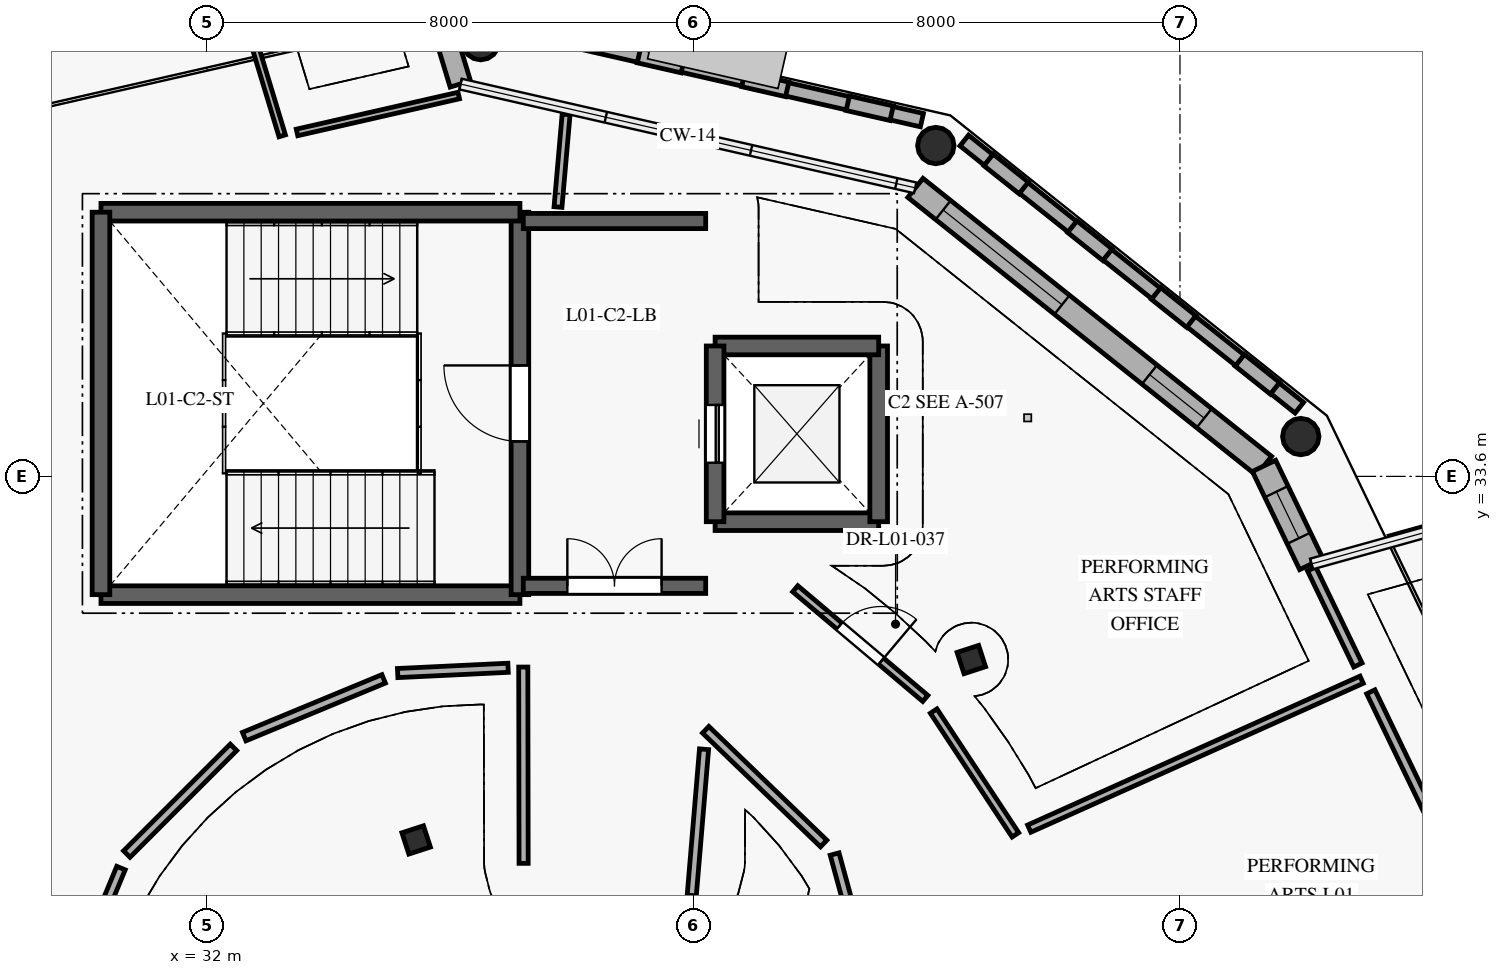
"""IFC4 building model, lengths in metres.
Left out: names, types, materials, properties, quantities, classifications, styles, units other than length and angle.
Written with IfcOpenShell. Run it as: python <this file> out.ifc"""

import sys

from ifc_helpers import new_model, si_unit, direction, frame, frame_2d, origin, origin_2d, place, context, subcontext, project, spatial, rectangle, circle, i_section, extrude, element, fill, save


model = new_model("IFC4")
c1 = context("Model", 3, precision=1e-05, world=origin(), true_north=direction((0.0, 1.0)))
c2 = subcontext(c1, "Body", "Model", "MODEL_VIEW")
j1 = project(units=[si_unit("LENGTHUNIT", "METRE"), si_unit("PLANEANGLEUNIT", "RADIAN")], contexts=[c1])
p1 = place(None, origin())
s1 = spatial("IfcSite", under=j1, at=p1, CompositionType="ELEMENT")
p2 = place(p1, origin())
s2 = spatial("IfcBuilding", under=s1, at=p2, CompositionType="ELEMENT")
p3 = place(p2, frame((0.0, 0.0, 4.2)))
s3 = spatial("IfcBuildingStorey", under=s2, at=p3, CompositionType="ELEMENT", Elevation=4.2)
for number, where, z_axis, x_axis in (
    (1, (35.439, 27.621, 0.0), (0.0, 0.0, 1.0), (0.951, 0.309, 0.0)),
    (2, (44.569, 30.588, 0.0), (0.0, 0.0, 1.0), (0.951, 0.309, 0.0)),
):
    element("IfcColumn", number, at=place(p3, frame(where, z_axis=z_axis, x_axis=x_axis)), inside=s3, PredefinedType="COLUMN", context=c2, shape_type="SweptSolid", body=[
        extrude(i_section(OverallWidth=0.373, OverallDepth=0.368, WebThickness=0.014, FlangeThickness=0.024, FilletRadius=0.015, at=origin_2d()), origin(), (0.0, 0.0, 1.0), 4.2),
    ])
for number, where, z_axis, x_axis in (
    (3, (49.987, 34.255, 0.0), (0.0, 0.0, 1.0), (-0.623, 0.782, 0.0)),
    (4, (43.985, 39.042, 0.0), (0.0, 0.0, 1.0), (-0.901, 0.434, 0.0)),
    (5, (36.5, 40.75, 0.0), (0.0, 0.0, 1.0), (-1.0, 0.0, 0.0)),
):
    element("IfcColumn", number, at=place(p3, frame(where, z_axis=z_axis, x_axis=x_axis)), inside=s3, PredefinedType="COLUMN", context=c2, shape_type="SweptSolid", body=[
        extrude(circle(Radius=0.3, at=origin_2d()), origin(), (0.0, 0.0, 1.0), 4.2),
    ])
p4 = place(p3, frame((43.649, 38.345, 0.0), z_axis=(0.0, 0.0, 1.0), x_axis=(0.781819636461, -0.623504655992, 0.0)))
e6 = element("IfcWall", 6, at=p4, inside=s3, PredefinedType="SOLIDWALL", context=c2, shape_type="SweptSolid", body=[
    extrude(rectangle(XDim=7.333, YDim=0.4, at=frame_2d((3.667, 0.0))), origin(), (0.0, 0.0, 1.0), 3.94),
])
p5 = place(p4, frame((0.583, 0.0, 0.85)))
e7 = element("IfcOpeningElement", 7, at=p5, cuts=e6, PredefinedType="OPENING", context=c2, shape_type="SweptSolid", body=[
    extrude(rectangle(XDim=2.5, YDim=1.3, at=frame_2d((1.25, 0.65))), frame((0.0, 0.21, 0.0), z_axis=(0.0, -1.0, 0.0), x_axis=(1.0, 0.0, 0.0)), (0.0, 0.0, 1.0), 0.42),
])
p6 = place(p4, frame((4.925, 0.0, 0.85)))
e8 = element("IfcOpeningElement", 8, at=p6, cuts=e6, PredefinedType="OPENING", context=c2, shape_type="SweptSolid", body=[
    extrude(rectangle(XDim=1.15, YDim=1.5, at=frame_2d((0.575, 0.75))), frame((0.0, 0.21, 0.0), z_axis=(0.0, -1.0, 0.0), x_axis=(1.0, 0.0, 0.0)), (0.0, 0.0, 1.0), 0.42),
])
p7 = place(p3, frame((49.382, 33.773, 0.0), z_axis=(0.0, 0.0, 1.0), x_axis=(0.433922119058, -0.90095038409, 0.0)))
e9 = element("IfcWall", 9, at=p7, inside=s3, PredefinedType="SOLIDWALL", context=c2, shape_type="SweptSolid", body=[
    extrude(rectangle(XDim=1.792, YDim=0.425, at=frame_2d((0.896, 0.0))), origin(), (0.0, 0.0, 1.0), 3.94),
])
p8 = place(p7, frame((0.471, 0.0, 0.85)))
e10 = element("IfcOpeningElement", 10, at=p8, cuts=e9, PredefinedType="OPENING", context=c2, shape_type="SweptSolid", body=[
    extrude(rectangle(XDim=0.85, YDim=1.4, at=frame_2d((0.425, 0.7))), frame((0.0, 0.222, 0.0), z_axis=(0.0, -1.0, 0.0), x_axis=(1.0, 0.0, 0.0)), (0.0, 0.0, 1.0), 0.445),
])
p9 = place(p3, frame((34.143, 46.728, 0.0), z_axis=(0.0, 0.0, 1.0), x_axis=(0.289999622439, -0.957026759806, 0.0)))
e11 = element("IfcWall", 11, at=p9, inside=s3, PredefinedType="SOLIDWALL", context=c2, shape_type="SweptSolid", body=[
    extrude(rectangle(XDim=6.974, YDim=0.35, at=frame_2d((3.487, 0.0))), origin(), (0.0, 0.0, 1.0), 3.369),
])
p10 = place(p9, frame((0.993, 0.0, 0.85)))
e12 = element("IfcOpeningElement", 12, at=p10, cuts=e11, PredefinedType="OPENING", context=c2, shape_type="SweptSolid", body=[
    extrude(rectangle(XDim=1.5, YDim=1.3, at=frame_2d((0.75, 0.65))), frame((0.0, 0.185, 0.0), z_axis=(0.0, -1.0, 0.0), x_axis=(1.0, 0.0, 0.0)), (0.0, 0.0, 1.0), 0.37),
])
p11 = place(p9, frame((4.231, 0.0, 0.85)))
e13 = element("IfcOpeningElement", 13, at=p11, cuts=e11, PredefinedType="OPENING", context=c2, shape_type="SweptSolid", body=[
    extrude(rectangle(XDim=2.0, YDim=1.3, at=frame_2d((1.0, 0.65))), frame((0.0, 0.185, 0.0), z_axis=(0.0, -1.0, 0.0), x_axis=(1.0, 0.0, 0.0)), (0.0, 0.0, 1.0), 0.37),
])
p12 = place(p3, frame((49.963, 34.73, 0.0), z_axis=(0.0, 0.0, 1.0), x_axis=(-0.781827630302, 0.623494632291, 0.0)))
e14 = element("IfcWall", 14, at=p12, inside=s3, PredefinedType="ELEMENTEDWALL", context=c2, shape_type="SweptSolid", body=[
    extrude(rectangle(XDim=7.048, YDim=0.225, at=frame_2d((3.524, 0.0))), origin(), (0.0, 0.0, 1.0), 1.09),
])
for number, where, z_axis, x_axis in (
    (15, (49.563, 35.048, 1.09), (0.0, 0.0, 1.0), (-0.782, 0.623, 0.0)),
    (16, (48.186, 36.147, 1.09), (0.0, 0.0, 1.0), (-0.782, 0.623, 0.0)),
    (17, (46.808, 37.246, 1.09), (0.0, 0.0, 1.0), (-0.782, 0.623, 0.0)),
    (18, (45.431, 38.344, 1.09), (0.0, 0.0, 1.0), (-0.782, 0.623, 0.0)),
):
    element("IfcWall", number, at=place(p3, frame(where, z_axis=z_axis, x_axis=x_axis)), inside=s3, PredefinedType="ELEMENTEDWALL", context=c2, shape_type="SweptSolid", body=[
        extrude(rectangle(XDim=0.74, YDim=0.245, at=frame_2d((0.37, 0.0))), origin(), (0.0, 0.0, 1.0), 2.85),
    ])
p13 = place(p3, frame((43.756, 39.459, 0.0), z_axis=(0.0, 0.0, 1.0), x_axis=(-0.974930278984, 0.222510564064, 0.0)))
e19 = element("IfcWall", 19, at=p13, inside=s3, PredefinedType="ELEMENTEDWALL", context=c2, shape_type="SweptSolid", body=[
    extrude(rectangle(XDim=7.046, YDim=0.225, at=frame_2d((3.523, 0.0))), origin(), (0.0, 0.0, 1.0), 1.09),
])
p14 = place(p3, frame((43.258, 39.573, 1.09), z_axis=(0.0, 0.0, 1.0), x_axis=(-0.974960788757, 0.222376843189, 0.0)))
e20 = element("IfcWall", 20, at=p14, inside=s3, PredefinedType="ELEMENTEDWALL", context=c2, shape_type="SweptSolid", body=[
    extrude(rectangle(XDim=0.74, YDim=0.245, at=frame_2d((0.37, 0.0))), origin(), (0.0, 0.0, 1.0), 2.85),
])
p15 = place(p3, frame((41.541, 39.965, 1.09), z_axis=(0.0, 0.0, 1.0), x_axis=(-0.974977096703, 0.222305332604, 0.0)))
e21 = element("IfcWall", 21, at=p15, inside=s3, PredefinedType="ELEMENTEDWALL", context=c2, shape_type="SweptSolid", body=[
    extrude(rectangle(XDim=0.74, YDim=0.245, at=frame_2d((0.37, 0.0))), origin(), (0.0, 0.0, 1.0), 2.85),
])
p16 = place(p3, frame((39.823, 40.357, 1.09), z_axis=(0.0, 0.0, 1.0), x_axis=(-0.974960788757, 0.222376843189, 0.0)))
e22 = element("IfcWall", 22, at=p16, inside=s3, PredefinedType="ELEMENTEDWALL", context=c2, shape_type="SweptSolid", body=[
    extrude(rectangle(XDim=0.74, YDim=0.245, at=frame_2d((0.37, 0.0))), origin(), (0.0, 0.0, 1.0), 2.85),
])
p17 = place(p3, frame((30.255, 31.655, 0.0), z_axis=(0.0, 0.0, 1.0), x_axis=(1.0, 0.0, 0.0)))
e23 = element("IfcWall", 23, at=p17, inside=s3, PredefinedType="SHEAR", context=c2, shape_type="SweptSolid", body=[
    extrude(rectangle(XDim=6.89, YDim=0.29, at=frame_2d((3.445, 0.0))), origin(), (0.0, 0.0, 1.0), 3.95),
])
p18 = place(p3, frame((37.145, 31.655, 0.0), z_axis=(0.0, 0.0, 1.0), x_axis=(0.0, 1.0, 0.0)))
e24 = element("IfcWall", 24, at=p18, inside=s3, PredefinedType="SHEAR", context=c2, shape_type="SweptSolid", body=[
    extrude(rectangle(XDim=6.29, YDim=0.29, at=frame_2d((3.145, 0.0))), origin(), (0.0, 0.0, 1.0), 3.95),
])
p19 = place(p18, frame((2.52, 0.0, 0.0)))
e25 = element("IfcOpeningElement", 25, at=p19, cuts=e24, PredefinedType="OPENING", context=c2, shape_type="SweptSolid", body=[
    extrude(rectangle(XDim=1.25, YDim=2.1, at=frame_2d((0.625, 1.05))), frame((0.0, 0.155, 0.0), z_axis=(0.0, -1.0, 0.0), x_axis=(1.0, 0.0, 0.0)), (0.0, 0.0, 1.0), 0.31),
])
p20 = place(p3, frame((37.145, 37.945, 0.0), z_axis=(0.0, 0.0, 1.0), x_axis=(-1.0, 0.0, 0.0)))
e26 = element("IfcWall", 26, at=p20, inside=s3, PredefinedType="SHEAR", context=c2, shape_type="SweptSolid", body=[
    extrude(rectangle(XDim=6.89, YDim=0.29, at=frame_2d((3.445, 0.0))), origin(), (0.0, 0.0, 1.0), 3.95),
])
p21 = place(p3, frame((30.255, 37.945, 0.0), z_axis=(0.0, 0.0, 1.0), x_axis=(0.0, -1.0, 0.0)))
e27 = element("IfcWall", 27, at=p21, inside=s3, PredefinedType="SHEAR", context=c2, shape_type="SweptSolid", body=[
    extrude(rectangle(XDim=6.29, YDim=0.29, at=frame_2d((3.145, 0.0))), origin(), (0.0, 0.0, 1.0), 3.95),
])
p22 = place(p3, frame((40.355, 32.855, 0.0), z_axis=(0.0, 0.0, 1.0), x_axis=(1.0, 0.0, 0.0)))
e28 = element("IfcWall", 28, at=p22, inside=s3, PredefinedType="SHEAR", context=c2, shape_type="SweptSolid", body=[
    extrude(rectangle(XDim=2.69, YDim=0.29, at=frame_2d((1.345, 0.0))), origin(), (0.0, 0.0, 1.0), 3.95),
])
p23 = place(p3, frame((43.045, 32.855, 0.0), z_axis=(0.0, 0.0, 1.0), x_axis=(0.0, 1.0, 0.0)))
e29 = element("IfcWall", 29, at=p23, inside=s3, PredefinedType="SHEAR", context=c2, shape_type="SweptSolid", body=[
    extrude(rectangle(XDim=2.89, YDim=0.29, at=frame_2d((1.445, 0.0))), origin(), (0.0, 0.0, 1.0), 3.95),
])
p24 = place(p3, frame((43.045, 35.745, 0.0), z_axis=(0.0, 0.0, 1.0), x_axis=(-1.0, 0.0, 0.0)))
e30 = element("IfcWall", 30, at=p24, inside=s3, PredefinedType="SHEAR", context=c2, shape_type="SweptSolid", body=[
    extrude(rectangle(XDim=2.69, YDim=0.29, at=frame_2d((1.345, 0.0))), origin(), (0.0, 0.0, 1.0), 3.95),
])
p25 = place(p3, frame((40.355, 35.745, 0.0), z_axis=(0.0, 0.0, 1.0), x_axis=(0.0, -1.0, 0.0)))
e31 = element("IfcWall", 31, at=p25, inside=s3, PredefinedType="SHEAR", context=c2, shape_type="SweptSolid", body=[
    extrude(rectangle(XDim=2.89, YDim=0.29, at=frame_2d((1.445, 0.0))), origin(), (0.0, 0.0, 1.0), 3.95),
])
p26 = place(p25, frame((0.97, 0.0, 0.0)))
e32 = element("IfcOpeningElement", 32, at=p26, cuts=e31, PredefinedType="OPENING", context=c2, shape_type="SweptSolid", body=[
    extrude(rectangle(XDim=0.95, YDim=2.1, at=frame_2d((0.475, 1.05))), frame((0.0, 0.155, 0.0), z_axis=(0.0, -1.0, 0.0), x_axis=(1.0, 0.0, 0.0)), (0.0, 0.0, 1.0), 0.31),
])
p27 = place(p3, frame((37.2, 31.8, 0.0), z_axis=(0.0, 0.0, 1.0), x_axis=(1.0, 0.0, 0.0)))
e33 = element("IfcWall", 33, at=p27, inside=s3, PredefinedType="SHEAR", context=c2, shape_type="SweptSolid", body=[
    extrude(rectangle(XDim=3.0, YDim=0.25, at=frame_2d((1.5, 0.0))), origin(), (0.0, 0.0, 1.0), 3.95),
])
p28 = place(p27, frame((0.725, 0.0, 0.0)))
e34 = element("IfcOpeningElement", 34, at=p28, cuts=e33, PredefinedType="OPENING", context=c2, shape_type="SweptSolid", body=[
    extrude(rectangle(XDim=1.55, YDim=2.15, at=frame_2d((0.775, 1.075))), frame((0.0, 0.135, 0.0), z_axis=(0.0, -1.0, 0.0), x_axis=(1.0, 0.0, 0.0)), (0.0, 0.0, 1.0), 0.27),
])
p29 = place(p3, frame((40.2, 37.8, 0.0), z_axis=(0.0, 0.0, 1.0), x_axis=(-1.0, 0.0, 0.0)))
e35 = element("IfcWall", 35, at=p29, inside=s3, PredefinedType="SHEAR", context=c2, shape_type="SweptSolid", body=[
    extrude(rectangle(XDim=3.0, YDim=0.25, at=frame_2d((1.5, 0.0))), origin(), (0.0, 0.0, 1.0), 3.95),
])
p30 = place(p3, frame((41.673, 31.752, 0.0), z_axis=(0.0, 0.0, 1.0), x_axis=(0.764524009618, -0.644595251858, 0.0)))
e36 = element("IfcWall", 36, at=p30, inside=s3, PredefinedType="PARTITIONING", context=c2, shape_type="SweptSolid", body=[
    extrude(rectangle(XDim=2.797, YDim=0.13, at=frame_2d((1.398, 0.0))), origin(), (0.0, 0.0, 1.0), 3.9),
])
p31 = place(p30, frame((0.948, 0.0, 0.0)))
e37 = element("IfcOpeningElement", 37, at=p31, cuts=e36, PredefinedType="OPENING", context=c2, shape_type="SweptSolid", body=[
    extrude(rectangle(XDim=0.9, YDim=2.05, at=frame_2d((0.45, 1.025))), frame((0.0, 0.075, 0.0), z_axis=(0.0, -1.0, 0.0), x_axis=(1.0, 0.0, 0.0)), (0.0, 0.0, 1.0), 0.15),
])
p32 = place(p3, frame((43.949, 29.74, 0.0), z_axis=(0.0, 0.0, 1.0), x_axis=(0.551022081773, -0.83449066226, 0.0)))
e38 = element("IfcWall", 38, at=p32, inside=s3, PredefinedType="PARTITIONING", context=c2, shape_type="SweptSolid", body=[
    extrude(rectangle(XDim=2.439, YDim=0.13, at=frame_2d((1.22, 0.0))), origin(), (0.0, 0.0, 1.0), 3.369),
])
p33 = place(p3, frame((45.521, 27.807, 0.0), z_axis=(0.0, 0.0, 1.0), x_axis=(0.912607408179, 0.408837031758, 0.0)))
e39 = element("IfcWall", 39, at=p33, inside=s3, PredefinedType="PARTITIONING", context=c2, shape_type="SweptSolid", body=[
    extrude(rectangle(XDim=5.99, YDim=0.13, at=frame_2d((2.995, 0.0))), origin(), (0.0, 0.0, 1.0), 3.9),
])
p34 = place(p3, frame((37.905, 39.554, 0.0), z_axis=(0.0, 0.0, 1.0), x_axis=(-0.087153089552, -0.996194930213, 0.0)))
e40 = element("IfcWall", 40, at=p34, inside=s3, PredefinedType="PARTITIONING", context=c2, shape_type="SweptSolid", body=[
    extrude(rectangle(XDim=1.53, YDim=0.13, at=frame_2d((0.765, 0.0))), origin(), (0.0, 0.0, 1.0), 3.9),
])
p35 = place(p3, frame((43.416, 23.368, 0.0), z_axis=(0.0, 0.0, 1.0), x_axis=(-0.262938935949, 0.964812477097, 0.0)))
e41 = element("IfcWall", 41, at=p35, inside=s3, PredefinedType="PARTITIONING", context=c2, shape_type="SweptSolid", body=[
    extrude(rectangle(XDim=4.167, YDim=0.15, at=frame_2d((2.083, 0.0))), origin(), (0.0, 0.0, 1.0), 3.9),
])
p36 = place(p35, frame((1.584, 0.0, 0.0)))
e42 = element("IfcOpeningElement", 42, at=p36, cuts=e41, PredefinedType="OPENING", context=c2, shape_type="SweptSolid", body=[
    extrude(rectangle(XDim=1.0, YDim=2.1, at=frame_2d((0.5, 1.05))), frame((0.0, 0.085, 0.0), z_axis=(0.0, -1.0, 0.0), x_axis=(1.0, 0.0, 0.0)), (0.0, 0.0, 1.0), 0.17),
])
p37 = place(p3, frame((42.141, 27.562, 0.0), z_axis=(0.0, 0.0, 1.0), x_axis=(-0.719849143542, 0.694130542867, 0.0)))
e43 = element("IfcWall", 43, at=p37, inside=s3, PredefinedType="PARTITIONING", context=c2, shape_type="SweptSolid", body=[
    extrude(rectangle(XDim=2.696, YDim=0.15, at=frame_2d((1.348, 0.0))), origin(), (0.0, 0.0, 1.0), 3.9),
])
p38 = place(p3, frame((40.173, 29.112, 0.0), z_axis=(0.0, 0.0, 1.0), x_axis=(-0.083924087796, -0.996472150884, 0.0)))
e44 = element("IfcWall", 44, at=p38, inside=s3, PredefinedType="PARTITIONING", context=c2, shape_type="SweptSolid", body=[
    extrude(rectangle(XDim=2.415, YDim=0.15, at=frame_2d((1.207, 0.0))), origin(), (0.0, 0.0, 1.0), 3.9),
])
p39 = place(p3, frame((37.206, 27.236, 0.0), z_axis=(0.0, 0.0, 1.0), x_axis=(-0.001814879044, 0.999998353106, 0.0)))
e45 = element("IfcWall", 45, at=p39, inside=s3, PredefinedType="PARTITIONING", context=c2, shape_type="SweptSolid", body=[
    extrude(rectangle(XDim=3.229, YDim=0.15, at=frame_2d((1.614, 0.0))), origin(), (0.0, 0.0, 1.0), 3.9),
])
p40 = place(p3, frame((36.95, 30.452, 0.0), z_axis=(0.0, 0.0, 1.0), x_axis=(-0.998855948809, -0.04782043004, 0.0)))
e46 = element("IfcWall", 46, at=p40, inside=s3, PredefinedType="PARTITIONING", context=c2, shape_type="SweptSolid", body=[
    extrude(rectangle(XDim=1.818, YDim=0.15, at=frame_2d((0.909, 0.0))), origin(), (0.0, 0.0, 1.0), 3.9),
])
p41 = place(p3, frame((34.904, 30.27, 0.0), z_axis=(0.0, 0.0, 1.0), x_axis=(-0.92387534344, -0.38269354552, 0.0)))
e47 = element("IfcWall", 47, at=p41, inside=s3, PredefinedType="PARTITIONING", context=c2, shape_type="SweptSolid", body=[
    extrude(rectangle(XDim=2.482, YDim=0.15, at=frame_2d((1.241, 0.0))), origin(), (0.0, 0.0, 1.0), 3.9),
])
for number, where, z_axis, x_axis in (
    (48, (32.434, 29.144, 0.0), (0.0, 0.0, 1.0), (-0.707, -0.707, 0.0)),
    (49, (30.584, 27.158, 0.0), (0.0, 0.0, 1.0), (-0.383, -0.924, 0.0)),
):
    element("IfcWall", number, at=place(p3, frame(where, z_axis=z_axis, x_axis=x_axis)), inside=s3, PredefinedType="PARTITIONING", context=c2, shape_type="SweptSolid", body=[
        extrude(rectangle(XDim=2.481, YDim=0.15, at=frame_2d((1.241, 0.0))), origin(), (0.0, 0.0, 1.0), 3.9),
    ])
p42 = place(p3, frame((50.166, 32.077, 0.0), z_axis=(0.0, 0.0, 1.0), x_axis=(0.433907727198, -0.900957315458, 0.0)))
e50 = element("IfcWall", 50, at=p42, inside=s3, PredefinedType="PARTITIONING", context=c2, shape_type="SweptSolid", body=[
    extrude(rectangle(XDim=1.753, YDim=0.15, at=frame_2d((0.876, 0.0))), origin(), (0.0, 0.0, 1.0), 3.9),
])
p43 = place(p3, frame((51.138, 30.057, 0.0), z_axis=(0.0, 0.0, 1.0), x_axis=(0.433887398365, -0.900967105693, 0.0)))
e51 = element("IfcWall", 51, at=p43, inside=s3, PredefinedType="PARTITIONING", context=c2, shape_type="SweptSolid", body=[
    extrude(rectangle(XDim=3.17, YDim=0.15, at=frame_2d((1.585, 0.0))), origin(), (0.0, 0.0, 1.0), 3.9),
])
p44 = place(p3, frame((21.365, 78.365, 0.0), z_axis=(0.0, 0.0, 1.0), x_axis=(0.290089355637, -0.95699956413, 0.0)))
e52 = element("IfcWall", 52, at=p44, inside=s3, PredefinedType="PARTITIONING", context=c2, shape_type="SweptSolid", body=[
    extrude(rectangle(XDim=40.923, YDim=0.11, at=frame_2d((20.461, 0.0))), origin(), (0.0, 0.0, 1.0), 3.9),
])
p45 = place(p44, frame((19.962, 0.0, 0.0)))
e53 = element("IfcOpeningElement", 53, at=p45, cuts=e52, PredefinedType="OPENING", context=c2, shape_type="SweptSolid", body=[
    extrude(rectangle(XDim=1.0, YDim=2.1, at=frame_2d((0.5, 1.05))), frame((0.0, 0.065, 0.0), z_axis=(0.0, -1.0, 0.0), x_axis=(1.0, 0.0, 0.0)), (0.0, 0.0, 1.0), 0.13),
])
p46 = place(p3, frame((33.479, 39.257, 0.0), z_axis=(0.0, 0.0, 1.0), x_axis=(0.974917901323, 0.222564789847, 0.0)))
e54 = element("IfcWall", 54, at=p46, inside=s3, PredefinedType="PARTITIONING", context=c2, shape_type="SweptSolid", body=[
    extrude(rectangle(XDim=2.728, YDim=0.11, at=frame_2d((1.364, 0.0))), origin(), (0.0, 0.0, 1.0), 3.9),
])
p47 = place(p5, origin())
e55 = element("IfcWindow", 55, at=p47, inside=s3, PartitioningType="SINGLE_PANEL", PredefinedType="WINDOW", context=c2, shape_type="SweptSolid", body=[
    extrude(rectangle(XDim=2.5, YDim=1.3, at=frame_2d((1.25, 0.65))), frame((0.0, 0.03, 0.0), z_axis=(0.0, -1.0, 0.0), x_axis=(1.0, 0.0, 0.0)), (0.0, 0.0, 1.0), 0.06),
])
fill(e7, e55)
p48 = place(p6, origin())
e56 = element("IfcWindow", 56, at=p48, inside=s3, PartitioningType="SINGLE_PANEL", PredefinedType="WINDOW", context=c2, shape_type="SweptSolid", body=[
    extrude(rectangle(XDim=1.15, YDim=1.5, at=frame_2d((0.575, 0.75))), frame((0.0, 0.03, 0.0), z_axis=(0.0, -1.0, 0.0), x_axis=(1.0, 0.0, 0.0)), (0.0, 0.0, 1.0), 0.06),
])
fill(e8, e56)
p49 = place(p8, origin())
e57 = element("IfcWindow", 57, at=p49, inside=s3, PartitioningType="SINGLE_PANEL", PredefinedType="WINDOW", context=c2, shape_type="SweptSolid", body=[
    extrude(rectangle(XDim=0.85, YDim=1.4, at=frame_2d((0.425, 0.7))), frame((0.0, 0.03, 0.0), z_axis=(0.0, -1.0, 0.0), x_axis=(1.0, 0.0, 0.0)), (0.0, 0.0, 1.0), 0.06),
])
fill(e10, e57)
p50 = place(p19, origin())
e58 = element("IfcDoor", 58, at=p50, inside=s3, OperationType="SINGLE_SWING_RIGHT", PredefinedType="DOOR", context=c2, shape_type="SweptSolid", body=[
    extrude(rectangle(XDim=1.25, YDim=2.1, at=frame_2d((0.625, 1.05))), frame((0.0, 0.025, 0.0), z_axis=(0.0, -1.0, 0.0), x_axis=(1.0, 0.0, 0.0)), (0.0, 0.0, 1.0), 0.05),
])
fill(e25, e58)
p51 = place(p26, frame((0.95, 0.0, 0.0), z_axis=(0.0, 0.0, 1.0), x_axis=(-1.0, 0.0, 0.0)))
e59 = element("IfcDoor", 59, at=p51, inside=s3, OperationType="SLIDING_TO_LEFT", PredefinedType="DOOR", context=c2, shape_type="SweptSolid", body=[
    extrude(rectangle(XDim=0.95, YDim=2.1, at=frame_2d((0.475, 1.05))), frame((0.0, 0.025, 0.0), z_axis=(0.0, -1.0, 0.0), x_axis=(1.0, 0.0, 0.0)), (0.0, 0.0, 1.0), 0.05),
])
fill(e32, e59)
p52 = place(p28, origin())
e60 = element("IfcDoor", 60, at=p52, inside=s3, OperationType="DOUBLE_DOOR_SINGLE_SWING", PredefinedType="DOOR", context=c2, shape_type="SweptSolid", body=[
    extrude(rectangle(XDim=1.55, YDim=2.15, at=frame_2d((0.775, 1.075))), frame((0.0, 0.025, 0.0), z_axis=(0.0, -1.0, 0.0), x_axis=(1.0, 0.0, 0.0)), (0.0, 0.0, 1.0), 0.05),
])
fill(e34, e60)
p53 = place(p31, origin())
e61 = element("IfcDoor", 61, at=p53, inside=s3, OperationType="SINGLE_SWING_RIGHT", PredefinedType="DOOR", context=c2, shape_type="SweptSolid", body=[
    extrude(rectangle(XDim=0.9, YDim=2.05, at=frame_2d((0.45, 1.025))), frame((0.0, 0.025, 0.0), z_axis=(0.0, -1.0, 0.0), x_axis=(1.0, 0.0, 0.0)), (0.0, 0.0, 1.0), 0.05),
])
fill(e37, e61)
save(model, sys.argv[1])
